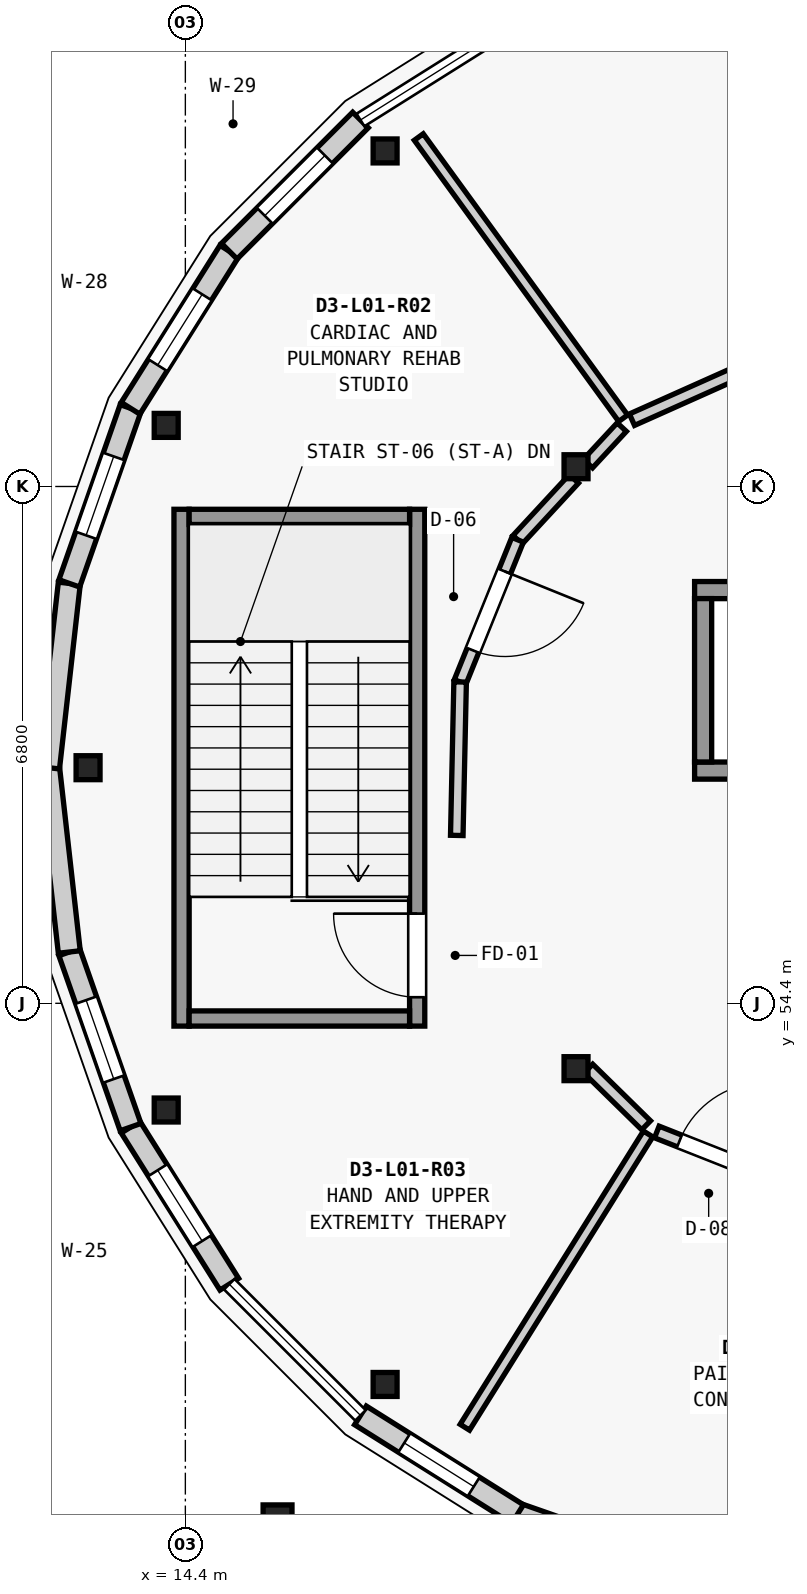
"""IFC4 building model, lengths in metres.
Left out: names, types, materials, properties, quantities, classifications, styles, units other than length and angle.
Written with IfcOpenShell. Run it as: python <this file> out.ifc"""

import sys

from ifc_helpers import new_model, si_unit, direction, frame, frame_2d, origin, origin_2d, place, context, subcontext, project, spatial, rectangle, circle, extrude, element, fill, save


model = new_model("IFC4")
c1 = context("Model", 3, precision=1e-05, world=origin(), true_north=direction((0.0, 1.0)))
c2 = subcontext(c1, "Body", "Model", "MODEL_VIEW")
j1 = project(units=[si_unit("LENGTHUNIT", "METRE"), si_unit("PLANEANGLEUNIT", "RADIAN")], contexts=[c1])
p1 = place(None, origin())
s1 = spatial("IfcSite", under=j1, at=p1, CompositionType="ELEMENT")
p2 = place(p1, origin())
s2 = spatial("IfcBuilding", under=s1, at=p2, CompositionType="ELEMENT")
p3 = place(p2, frame((0.0, 0.0, 4.55)))
s3 = spatial("IfcBuildingStorey", under=s2, at=p3, CompositionType="ELEMENT", Elevation=4.55)
for number, where, z_axis, x_axis in (
    (1, (17.028, 65.615, 0.0), (0.0, 0.0, 1.0), (1.0, 0.0, 0.0)),
    (2, (14.148, 62.004, 0.0), (0.0, 0.0, 1.0), (1.0, 0.0, 0.0)),
    (3, (13.12, 57.5, 0.0), (0.0, 0.0, 1.0), (1.0, 0.0, 0.0)),
    (4, (14.148, 52.996, 0.0), (0.0, 0.0, 1.0), (1.0, 0.0, 0.0)),
    (5, (17.028, 49.385, 0.0), (0.0, 0.0, 1.0), (1.0, 0.0, 0.0)),
    (6, (19.54, 61.46, 0.0), (0.0, 0.0, 1.0), (1.0, 0.0, 0.0)),
    (7, (19.54, 53.54, 0.0), (0.0, 0.0, 1.0), (1.0, 0.0, 0.0)),
):
    element("IfcColumn", number, at=place(p3, frame(where, z_axis=z_axis, x_axis=x_axis)), inside=s3, PredefinedType="COLUMN", context=c2, shape_type="SweptSolid", body=[
        extrude(rectangle(XDim=0.315, YDim=0.315, at=origin_2d()), origin(), (0.0, 0.0, 1.0), 4.2),
    ])
p4 = place(p3, frame((15.613, 47.61, 0.0), z_axis=(0.0, 0.0, 1.0), x_axis=(1.0, 0.0, 0.0)))
e8 = element("IfcColumn", 8, at=p4, inside=s3, PredefinedType="PILASTER", context=c2, shape_type="SweptSolid", body=[
    extrude(circle(Radius=0.19, at=origin_2d()), origin(), (0.0, 0.0, 1.0), 4.2),
])
p5 = place(p3, frame((21.075, 46.873, 0.0), z_axis=(0.0, 0.0, 1.0), x_axis=(-0.943919156274, 0.330176659411, 0.0)))
e9 = element("IfcWall", 9, at=p5, inside=s3, PredefinedType="ELEMENTEDWALL", context=c2, shape_type="SweptSolid", body=[
    extrude(rectangle(XDim=2.441, YDim=0.29, at=frame_2d((1.22, 0.0))), origin(), (0.0, 0.0, 1.0), 3.314),
])
p6 = place(p5, frame((0.68, 0.0, 0.85)))
e10 = element("IfcOpeningElement", 10, at=p6, cuts=e9, PredefinedType="OPENING", context=c2, shape_type="SweptSolid", body=[
    extrude(rectangle(XDim=1.08, YDim=1.5, at=frame_2d((0.54, 0.75))), frame((0.0, 0.155, 0.0), z_axis=(0.0, -1.0, 0.0), x_axis=(1.0, 0.0, 0.0)), (0.0, 0.0, 1.0), 0.31),
])
p7 = place(p3, frame((18.771, 47.679, 0.0), z_axis=(0.0, 0.0, 1.0), x_axis=(-0.846658434148, 0.532136726684, 0.0)))
e11 = element("IfcWall", 11, at=p7, inside=s3, PredefinedType="ELEMENTEDWALL", context=c2, shape_type="SweptSolid", body=[
    extrude(rectangle(XDim=2.441, YDim=0.29, at=frame_2d((1.221, 0.0))), origin(), (0.0, 0.0, 1.0), 3.314),
])
p8 = place(p7, frame((0.681, 0.0, 0.85)))
e12 = element("IfcOpeningElement", 12, at=p8, cuts=e11, PredefinedType="OPENING", context=c2, shape_type="SweptSolid", body=[
    extrude(rectangle(XDim=1.08, YDim=1.8, at=frame_2d((0.54, 0.9))), frame((0.0, 0.155, 0.0), z_axis=(0.0, -1.0, 0.0), x_axis=(1.0, 0.0, 0.0)), (0.0, 0.0, 1.0), 0.31),
])
p9 = place(p3, frame((14.978, 50.704, 0.0), z_axis=(0.0, 0.0, 1.0), x_axis=(-0.532136726684, 0.846658434148, 0.0)))
e13 = element("IfcWall", 13, at=p9, inside=s3, PredefinedType="ELEMENTEDWALL", context=c2, shape_type="SweptSolid", body=[
    extrude(rectangle(XDim=2.441, YDim=0.29, at=frame_2d((1.221, 0.0))), origin(), (0.0, 0.0, 1.0), 3.314),
])
p10 = place(p9, frame((0.671, 0.0, 0.85)))
e14 = element("IfcOpeningElement", 14, at=p10, cuts=e13, PredefinedType="OPENING", context=c2, shape_type="SweptSolid", body=[
    extrude(rectangle(XDim=1.1, YDim=1.25, at=frame_2d((0.55, 0.625))), frame((0.0, 0.155, 0.0), z_axis=(0.0, -1.0, 0.0), x_axis=(1.0, 0.0, 0.0)), (0.0, 0.0, 1.0), 0.31),
])
p11 = place(p3, frame((13.679, 52.771, 0.0), z_axis=(0.0, 0.0, 1.0), x_axis=(-0.330176659411, 0.943919156274, 0.0)))
e15 = element("IfcWall", 15, at=p11, inside=s3, PredefinedType="ELEMENTEDWALL", context=c2, shape_type="SweptSolid", body=[
    extrude(rectangle(XDim=2.441, YDim=0.29, at=frame_2d((1.22, 0.0))), origin(), (0.0, 0.0, 1.0), 3.314),
])
p12 = place(p11, frame((0.67, 0.0, 0.85)))
e16 = element("IfcOpeningElement", 16, at=p12, cuts=e15, PredefinedType="OPENING", context=c2, shape_type="SweptSolid", body=[
    extrude(rectangle(XDim=1.1, YDim=1.5, at=frame_2d((0.55, 0.75))), frame((0.0, 0.155, 0.0), z_axis=(0.0, -1.0, 0.0), x_axis=(1.0, 0.0, 0.0)), (0.0, 0.0, 1.0), 0.31),
])
for number, where, z_axis, x_axis in (
    (17, (12.873, 55.075, 0.0), (0.0, 0.0, 1.0), (-0.112, 0.994, 0.0)),
    (18, (12.6, 57.5, 0.0), (0.0, 0.0, 1.0), (0.112, 0.994, 0.0)),
):
    element("IfcWall", number, at=place(p3, frame(where, z_axis=z_axis, x_axis=x_axis)), inside=s3, PredefinedType="ELEMENTEDWALL", context=c2, shape_type="SweptSolid", body=[
        extrude(rectangle(XDim=2.44, YDim=0.29, at=frame_2d((1.22, 0.0))), origin(), (0.0, 0.0, 1.0), 3.314),
    ])
p13 = place(p3, frame((12.873, 59.925, 0.0), z_axis=(0.0, 0.0, 1.0), x_axis=(0.330176659411, 0.943919156274, 0.0)))
e19 = element("IfcWall", 19, at=p13, inside=s3, PredefinedType="ELEMENTEDWALL", context=c2, shape_type="SweptSolid", body=[
    extrude(rectangle(XDim=2.441, YDim=0.29, at=frame_2d((1.22, 0.0))), origin(), (0.0, 0.0, 1.0), 3.314),
])
p14 = place(p13, frame((0.67, 0.0, 0.85)))
e20 = element("IfcOpeningElement", 20, at=p14, cuts=e19, PredefinedType="OPENING", context=c2, shape_type="SweptSolid", body=[
    extrude(rectangle(XDim=1.1, YDim=1.85, at=frame_2d((0.55, 0.925))), frame((0.0, 0.155, 0.0), z_axis=(0.0, -1.0, 0.0), x_axis=(1.0, 0.0, 0.0)), (0.0, 0.0, 1.0), 0.31),
])
p15 = place(p3, frame((13.679, 62.229, 0.0), z_axis=(0.0, 0.0, 1.0), x_axis=(0.532136726684, 0.846658434148, 0.0)))
e21 = element("IfcWall", 21, at=p15, inside=s3, PredefinedType="ELEMENTEDWALL", context=c2, shape_type="SweptSolid", body=[
    extrude(rectangle(XDim=2.441, YDim=0.29, at=frame_2d((1.221, 0.0))), origin(), (0.0, 0.0, 1.0), 3.314),
])
p16 = place(p15, frame((0.671, 0.0, 0.85)))
e22 = element("IfcOpeningElement", 22, at=p16, cuts=e21, PredefinedType="OPENING", context=c2, shape_type="SweptSolid", body=[
    extrude(rectangle(XDim=1.1, YDim=2.1, at=frame_2d((0.55, 1.05))), frame((0.0, 0.155, 0.0), z_axis=(0.0, -1.0, 0.0), x_axis=(1.0, 0.0, 0.0)), (0.0, 0.0, 1.0), 0.31),
])
p17 = place(p3, frame((14.978, 64.296, 0.0), z_axis=(0.0, 0.0, 1.0), x_axis=(0.707106781187, 0.707106781187, 0.0)))
e23 = element("IfcWall", 23, at=p17, inside=s3, PredefinedType="ELEMENTEDWALL", context=c2, shape_type="SweptSolid", body=[
    extrude(rectangle(XDim=2.441, YDim=0.29, at=frame_2d((1.22, 0.0))), origin(), (0.0, 0.0, 1.0), 3.314),
])
p18 = place(p17, frame((0.66, 0.0, 0.85)))
e24 = element("IfcOpeningElement", 24, at=p18, cuts=e23, PredefinedType="OPENING", context=c2, shape_type="SweptSolid", body=[
    extrude(rectangle(XDim=1.12, YDim=1.65, at=frame_2d((0.56, 0.825))), frame((0.0, 0.155, 0.0), z_axis=(0.0, -1.0, 0.0), x_axis=(1.0, 0.0, 0.0)), (0.0, 0.0, 1.0), 0.31),
])
p19 = place(p3, frame((17.45, 54.1, 0.0), z_axis=(0.0, 0.0, 1.0), x_axis=(0.0, 1.0, 0.0)))
e25 = element("IfcWall", 25, at=p19, inside=s3, PredefinedType="SHEAR", context=c2, shape_type="SweptSolid", body=[
    extrude(rectangle(XDim=6.8, YDim=0.2, at=frame_2d((3.4, 0.0))), origin(), (0.0, 0.0, 1.0), 3.96),
])
p20 = place(p19, frame((0.38, 0.0, 0.0)))
e26 = element("IfcOpeningElement", 26, at=p20, cuts=e25, PredefinedType="OPENING", context=c2, shape_type="SweptSolid", body=[
    extrude(rectangle(XDim=1.1, YDim=2.15, at=frame_2d((0.55, 1.075))), frame((0.0, 0.11, 0.0), z_axis=(0.0, -1.0, 0.0), x_axis=(1.0, 0.0, 0.0)), (0.0, 0.0, 1.0), 0.22),
])
p21 = place(p3, frame((14.35, 54.1, 0.0), z_axis=(0.0, 0.0, 1.0), x_axis=(0.0, 1.0, 0.0)))
e27 = element("IfcWall", 27, at=p21, inside=s3, PredefinedType="SHEAR", context=c2, shape_type="SweptSolid", body=[
    extrude(rectangle(XDim=6.8, YDim=0.2, at=frame_2d((3.4, 0.0))), origin(), (0.0, 0.0, 1.0), 3.96),
])
for number, where, z_axis, x_axis in (
    (28, (17.35, 54.2, 0.0), (0.0, 0.0, 1.0), (-1.0, 0.0, 0.0)),
    (29, (17.35, 60.8, 0.0), (0.0, 0.0, 1.0), (-1.0, 0.0, 0.0)),
):
    element("IfcWall", number, at=place(p3, frame(where, z_axis=z_axis, x_axis=x_axis)), inside=s3, PredefinedType="SHEAR", context=c2, shape_type="SweptSolid", body=[
        extrude(rectangle(XDim=2.9, YDim=0.2, at=frame_2d((1.45, 0.0))), origin(), (0.0, 0.0, 1.0), 3.96),
    ])
p22 = place(p3, frame((21.1, 57.462, 0.0), z_axis=(0.0, 0.0, 1.0), x_axis=(1.0, 0.0, 0.0)))
e30 = element("IfcWall", 30, at=p22, inside=s3, PredefinedType="SHEAR", context=c2, shape_type="SweptSolid", body=[
    extrude(rectangle(XDim=3.1, YDim=0.225, at=frame_2d((1.55, 0.0))), origin(), (0.0, 0.0, 1.0), 3.96),
])
p23 = place(p22, frame((0.95, 0.0, 0.0)))
e31 = element("IfcOpeningElement", 31, at=p23, cuts=e30, PredefinedType="OPENING", context=c2, shape_type="SweptSolid", body=[
    extrude(rectangle(XDim=1.2, YDim=2.2, at=frame_2d((0.6, 1.1))), frame((0.0, 0.123, 0.0), z_axis=(0.0, -1.0, 0.0), x_axis=(1.0, 0.0, 0.0)), (0.0, 0.0, 1.0), 0.245),
])
p24 = place(p3, frame((21.1, 59.837, 0.0), z_axis=(0.0, 0.0, 1.0), x_axis=(1.0, 0.0, 0.0)))
e32 = element("IfcWall", 32, at=p24, inside=s3, PredefinedType="SHEAR", context=c2, shape_type="SweptSolid", body=[
    extrude(rectangle(XDim=3.1, YDim=0.225, at=frame_2d((1.55, 0.0))), origin(), (0.0, 0.0, 1.0), 3.96),
])
p25 = place(p3, frame((21.212, 57.575, 0.0), z_axis=(0.0, 0.0, 1.0), x_axis=(0.0, 1.0, 0.0)))
e33 = element("IfcWall", 33, at=p25, inside=s3, PredefinedType="SHEAR", context=c2, shape_type="SweptSolid", body=[
    extrude(rectangle(XDim=2.15, YDim=0.225, at=frame_2d((1.075, 0.0))), origin(), (0.0, 0.0, 1.0), 3.96),
])
p26 = place(p3, frame((20.16, 62.098, 0.0), z_axis=(0.0, 0.0, 1.0), x_axis=(-0.587873334136, 0.808952991843, 0.0)))
e34 = element("IfcWall", 34, at=p26, inside=s3, PredefinedType="PARTITIONING", context=c2, shape_type="SweptSolid", body=[
    extrude(rectangle(XDim=4.574, YDim=0.145, at=frame_2d((2.287, 0.0))), origin(), (0.0, 0.0, 1.0), 3.279),
])
p27 = place(p3, frame((20.488, 52.681, 0.0), z_axis=(0.0, 0.0, 1.0), x_axis=(-0.529892832375, -0.848064612042, 0.0)))
e35 = element("IfcWall", 35, at=p27, inside=s3, PredefinedType="PARTITIONING", context=c2, shape_type="SweptSolid", body=[
    extrude(rectangle(XDim=4.55, YDim=0.145, at=frame_2d((2.275, 0.0))), origin(), (0.0, 0.0, 1.0), 3.279),
])
p28 = place(p3, frame((22.236, 62.955, 0.0), z_axis=(0.0, 0.0, 1.0), x_axis=(-0.912984379162, -0.407994513941, 0.0)))
e36 = element("IfcWall", 36, at=p28, inside=s3, PredefinedType="PARTITIONING", context=c2, shape_type="SweptSolid", body=[
    extrude(rectangle(XDim=2.147, YDim=0.165, at=frame_2d((1.073, 0.0))), origin(), (0.0, 0.0, 1.0), 3.279),
])
p29 = place(p3, frame((20.142, 61.981, 0.0), z_axis=(0.0, 0.0, 1.0), x_axis=(-0.679935917373, -0.73327153788, 0.0)))
e37 = element("IfcWall", 37, at=p29, inside=s3, PredefinedType="PARTITIONING", context=c2, shape_type="SweptSolid", body=[
    extrude(rectangle(XDim=0.655, YDim=0.165, at=frame_2d((0.327, 0.0))), origin(), (0.0, 0.0, 1.0), 3.279),
])
p30 = place(p3, frame((19.512, 61.3, 0.0), z_axis=(0.0, 0.0, 1.0), x_axis=(-0.679051024612, -0.734091074713, 0.0)))
e38 = element("IfcWall", 38, at=p30, inside=s3, PredefinedType="PARTITIONING", context=c2, shape_type="SweptSolid", body=[
    extrude(rectangle(XDim=1.091, YDim=0.165, at=frame_2d((0.545, 0.0))), origin(), (0.0, 0.0, 1.0), 3.279),
])
p31 = place(p3, frame((18.771, 60.499, 0.0), z_axis=(0.0, 0.0, 1.0), x_axis=(-0.374663065009, -0.927161036562, 0.0)))
e39 = element("IfcWall", 39, at=p31, inside=s3, PredefinedType="PARTITIONING", context=c2, shape_type="SweptSolid", body=[
    extrude(rectangle(XDim=2.018, YDim=0.165, at=frame_2d((1.009, 0.0))), origin(), (0.0, 0.0, 1.0), 3.279),
])
p32 = place(p31, frame((0.449, 0.0, 0.0)))
e40 = element("IfcOpeningElement", 40, at=p32, cuts=e39, PredefinedType="OPENING", context=c2, shape_type="SweptSolid", body=[
    extrude(rectangle(XDim=1.12, YDim=2.16, at=frame_2d((0.56, 1.08))), frame((0.0, 0.093, 0.0), z_axis=(0.0, -1.0, 0.0), x_axis=(1.0, 0.0, 0.0)), (0.0, 0.0, 1.0), 0.185),
])
p33 = place(p3, frame((18.015, 58.628, 0.0), z_axis=(0.0, 0.0, 1.0), x_axis=(-0.021760263499, -0.999763217433, 0.0)))
e41 = element("IfcWall", 41, at=p33, inside=s3, PredefinedType="PARTITIONING", context=c2, shape_type="SweptSolid", body=[
    extrude(rectangle(XDim=2.02, YDim=0.165, at=frame_2d((1.01, 0.0))), origin(), (0.0, 0.0, 1.0), 3.279),
])
p34 = place(p3, frame((19.702, 53.54, 0.0), z_axis=(0.0, 0.0, 1.0), x_axis=(0.714068342312, -0.700075997666, 0.0)))
e42 = element("IfcWall", 42, at=p34, inside=s3, PredefinedType="PARTITIONING", context=c2, shape_type="SweptSolid", body=[
    extrude(rectangle(XDim=1.064, YDim=0.165, at=frame_2d((0.532, 0.0))), origin(), (0.0, 0.0, 1.0), 3.279),
])
p35 = place(p3, frame((20.603, 52.707, 0.0), z_axis=(0.0, 0.0, 1.0), x_axis=(0.929969054131, -0.367637808663, 0.0)))
e43 = element("IfcWall", 43, at=p35, inside=s3, PredefinedType="PARTITIONING", context=c2, shape_type="SweptSolid", body=[
    extrude(rectangle(XDim=1.864, YDim=0.165, at=frame_2d((0.932, 0.0))), origin(), (0.0, 0.0, 1.0), 3.279),
])
p36 = place(p35, frame((0.321, 0.0, 0.0)))
e44 = element("IfcOpeningElement", 44, at=p36, cuts=e43, PredefinedType="OPENING", context=c2, shape_type="SweptSolid", body=[
    extrude(rectangle(XDim=1.22, YDim=2.18, at=frame_2d((0.61, 1.09))), frame((0.0, 0.093, 0.0), z_axis=(0.0, -1.0, 0.0), x_axis=(1.0, 0.0, 0.0)), (0.0, 0.0, 1.0), 0.185),
])
p37 = place(p8, origin())
e45 = element("IfcWindow", 45, at=p37, inside=s3, PartitioningType="SINGLE_PANEL", PredefinedType="WINDOW", context=c2, shape_type="SweptSolid", body=[
    extrude(rectangle(XDim=1.08, YDim=1.8, at=frame_2d((0.54, 0.9))), frame((0.0, 0.03, 0.0), z_axis=(0.0, -1.0, 0.0), x_axis=(1.0, 0.0, 0.0)), (0.0, 0.0, 1.0), 0.06),
])
fill(e12, e45)
p38 = place(p10, origin())
e46 = element("IfcWindow", 46, at=p38, inside=s3, PartitioningType="SINGLE_PANEL", PredefinedType="WINDOW", context=c2, shape_type="SweptSolid", body=[
    extrude(rectangle(XDim=1.1, YDim=1.25, at=frame_2d((0.55, 0.625))), frame((0.0, 0.03, 0.0), z_axis=(0.0, -1.0, 0.0), x_axis=(1.0, 0.0, 0.0)), (0.0, 0.0, 1.0), 0.06),
])
fill(e14, e46)
p39 = place(p12, origin())
e47 = element("IfcWindow", 47, at=p39, inside=s3, PartitioningType="SINGLE_PANEL", PredefinedType="WINDOW", context=c2, shape_type="SweptSolid", body=[
    extrude(rectangle(XDim=1.1, YDim=1.5, at=frame_2d((0.55, 0.75))), frame((0.0, 0.03, 0.0), z_axis=(0.0, -1.0, 0.0), x_axis=(1.0, 0.0, 0.0)), (0.0, 0.0, 1.0), 0.06),
])
fill(e16, e47)
p40 = place(p14, origin())
e48 = element("IfcWindow", 48, at=p40, inside=s3, PartitioningType="SINGLE_PANEL", PredefinedType="WINDOW", context=c2, shape_type="SweptSolid", body=[
    extrude(rectangle(XDim=1.1, YDim=1.85, at=frame_2d((0.55, 0.925))), frame((0.0, 0.03, 0.0), z_axis=(0.0, -1.0, 0.0), x_axis=(1.0, 0.0, 0.0)), (0.0, 0.0, 1.0), 0.06),
])
fill(e20, e48)
p41 = place(p16, origin())
e49 = element("IfcWindow", 49, at=p41, inside=s3, PartitioningType="SINGLE_PANEL", PredefinedType="WINDOW", context=c2, shape_type="SweptSolid", body=[
    extrude(rectangle(XDim=1.1, YDim=2.1, at=frame_2d((0.55, 1.05))), frame((0.0, 0.03, 0.0), z_axis=(0.0, -1.0, 0.0), x_axis=(1.0, 0.0, 0.0)), (0.0, 0.0, 1.0), 0.06),
])
fill(e22, e49)
p42 = place(p18, origin())
e50 = element("IfcWindow", 50, at=p42, inside=s3, PartitioningType="SINGLE_PANEL", PredefinedType="WINDOW", context=c2, shape_type="SweptSolid", body=[
    extrude(rectangle(XDim=1.12, YDim=1.65, at=frame_2d((0.56, 0.825))), frame((0.0, 0.03, 0.0), z_axis=(0.0, -1.0, 0.0), x_axis=(1.0, 0.0, 0.0)), (0.0, 0.0, 1.0), 0.06),
])
fill(e24, e50)
p43 = place(p20, origin())
e51 = element("IfcDoor", 51, at=p43, inside=s3, OperationType="SINGLE_SWING_RIGHT", PredefinedType="DOOR", context=c2, shape_type="SweptSolid", body=[
    extrude(rectangle(XDim=1.1, YDim=2.15, at=frame_2d((0.55, 1.075))), frame((0.0, 0.025, 0.0), z_axis=(0.0, -1.0, 0.0), x_axis=(1.0, 0.0, 0.0)), (0.0, 0.0, 1.0), 0.05),
])
fill(e26, e51)
p44 = place(p32, origin())
e52 = element("IfcDoor", 52, at=p44, inside=s3, OperationType="SINGLE_SWING_LEFT", PredefinedType="DOOR", context=c2, shape_type="SweptSolid", body=[
    extrude(rectangle(XDim=1.12, YDim=2.16, at=frame_2d((0.56, 1.08))), frame((0.0, 0.025, 0.0), z_axis=(0.0, -1.0, 0.0), x_axis=(1.0, 0.0, 0.0)), (0.0, 0.0, 1.0), 0.05),
])
fill(e40, e52)
p45 = place(p36, origin())
e53 = element("IfcDoor", 53, at=p45, inside=s3, OperationType="SINGLE_SWING_RIGHT", PredefinedType="DOOR", context=c2, shape_type="SweptSolid", body=[
    extrude(rectangle(XDim=1.22, YDim=2.18, at=frame_2d((0.61, 1.09))), frame((0.0, 0.025, 0.0), z_axis=(0.0, -1.0, 0.0), x_axis=(1.0, 0.0, 0.0)), (0.0, 0.0, 1.0), 0.05),
])
fill(e44, e53)
save(model, sys.argv[1])
